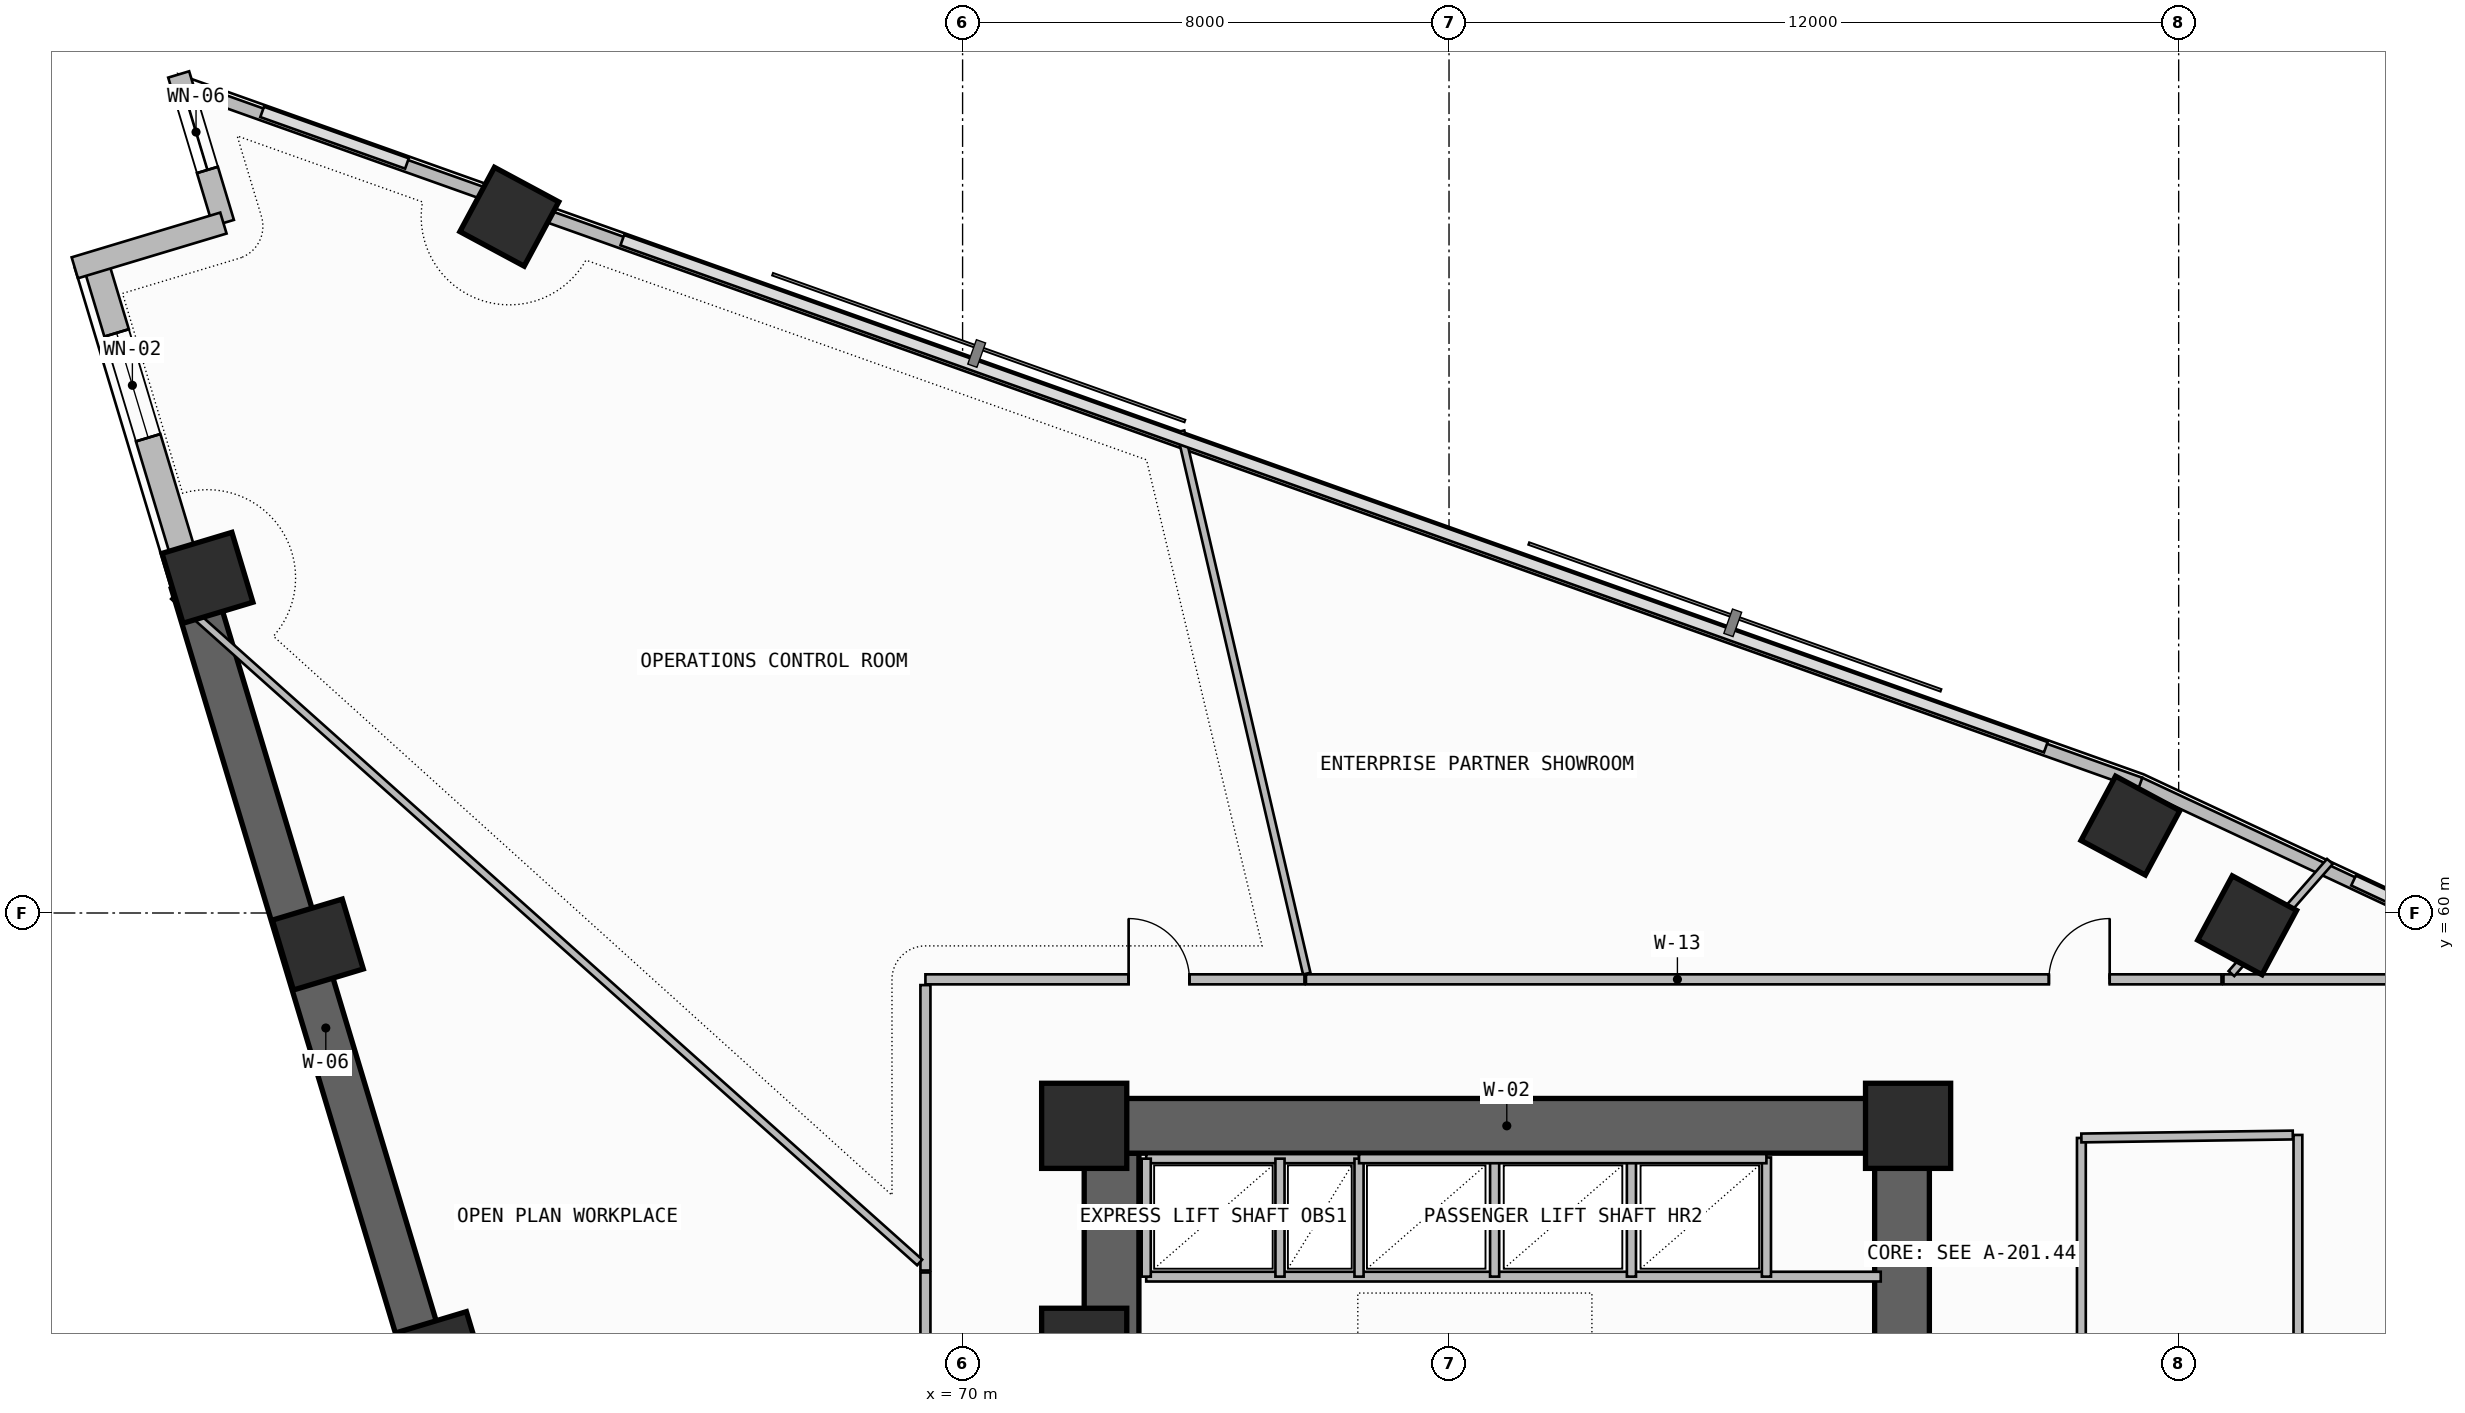
"""IFC4 building model, lengths in metres.
Left out: names, types, materials, properties, quantities, classifications, styles, units other than length and angle.
Written with IfcOpenShell. Run it as: python <this file> out.ifc"""

import sys

from ifc_helpers import new_model, si_unit, direction, frame, frame_2d, origin, origin_2d, place, context, subcontext, project, spatial, rectangle, extrude, element, fill, save


model = new_model("IFC4")
c1 = context("Model", 3, precision=1e-05, world=origin(), true_north=direction((0.0, 1.0)))
c2 = subcontext(c1, "Body", "Model", "MODEL_VIEW")
j1 = project(units=[si_unit("LENGTHUNIT", "METRE"), si_unit("PLANEANGLEUNIT", "RADIAN")], contexts=[c1])
p1 = place(None, origin())
s1 = spatial("IfcSite", under=j1, at=p1, CompositionType="ELEMENT")
p2 = place(p1, origin())
s2 = spatial("IfcBuilding", under=s1, at=p2, CompositionType="ELEMENT")
p3 = place(p2, frame((0.0, 0.0, 157.5)))
s3 = spatial("IfcBuildingStorey", under=s2, at=p3, CompositionType="ELEMENT", Elevation=157.5)
p4 = place(p3, frame((72.45, 43.35, -0.26), z_axis=(0.0, 0.0, 1.0), x_axis=(0.0, 1.0, 0.0)))
e1 = element("IfcWall", 1, at=p4, inside=s3, PredefinedType="SHEAR", context=c2, shape_type="SweptSolid", body=[
    extrude(rectangle(XDim=12.7, YDim=0.9, at=frame_2d((6.35, 0.0))), origin(), (0.0, 0.0, 1.0), 3.6),
])
p5 = place(p4, frame((1.35, 0.0, 0.26)))
e2 = element("IfcOpeningElement", 2, at=p5, cuts=e1, PredefinedType="OPENING", context=c2, shape_type="SweptSolid", body=[
    extrude(rectangle(XDim=1.2, YDim=2.2, at=frame_2d((0.6, 1.1))), frame((0.0, 0.46, 0.0), z_axis=(0.0, -1.0, 0.0), x_axis=(1.0, 0.0, 0.0)), (0.0, 0.0, 1.0), 0.92),
])
p6 = place(p3, frame((72.0, 56.5, -0.26), z_axis=(0.0, 0.0, 1.0), x_axis=(1.0, 0.0, 0.0)))
e3 = element("IfcWall", 3, at=p6, inside=s3, PredefinedType="SHEAR", context=c2, shape_type="SweptSolid", body=[
    extrude(rectangle(XDim=13.9, YDim=0.9, at=frame_2d((6.95, 0.0))), origin(), (0.0, 0.0, 1.0), 3.6),
])
p7 = place(p3, frame((85.45, 47.6, -0.26), z_axis=(0.0, 0.0, 1.0), x_axis=(0.0, 1.0, 0.0)))
e4 = element("IfcWall", 4, at=p7, inside=s3, PredefinedType="SHEAR", context=c2, shape_type="SweptSolid", body=[
    extrude(rectangle(XDim=8.45, YDim=0.9, at=frame_2d((4.225, 0.0))), origin(), (0.0, 0.0, 1.0), 3.6),
])
for number, where, z_axis, x_axis in (
    (5, (72.0, 52.8, 0.0), (0.0, 0.0, 1.0), (1.0, 0.0, 0.0)),
    (6, (72.0, 56.5, 0.0), (0.0, 0.0, 1.0), (1.0, 0.0, 0.0)),
    (7, (85.55, 56.5, 0.0), (0.0, 0.0, 1.0), (1.0, 0.0, 0.0)),
):
    element("IfcColumn", number, at=place(p3, frame(where, z_axis=z_axis, x_axis=x_axis)), inside=s3, PredefinedType="COLUMN", context=c2, shape_type="SweptSolid", body=[
        extrude(rectangle(XDim=1.4, YDim=1.4, at=origin_2d()), origin(), (0.0, 0.0, 1.0), 3.6),
    ])
for number, where, z_axis, x_axis in (
    (8, (91.126, 59.798, 0.0), (0.0, 0.0, 1.0), (0.473, 0.881, 0.0)),
    (9, (89.207, 61.438, 0.0), (0.0, 0.0, 1.0), (0.473, 0.881, 0.0)),
    (10, (62.545, 71.45, 0.0), (0.0, 0.0, 1.0), (0.473, 0.881, 0.0)),
    (11, (57.581, 65.512, 0.0), (0.0, 0.0, 1.0), (-0.288, 0.958, 0.0)),
    (12, (59.396, 59.481, 0.0), (0.0, 0.0, 1.0), (-0.288, 0.958, 0.0)),
    (13, (61.438, 52.696, 0.0), (0.0, 0.0, 1.0), (-0.288, 0.958, 0.0)),
):
    element("IfcColumn", number, at=place(p3, frame(where, z_axis=z_axis, x_axis=x_axis)), inside=s3, PredefinedType="COLUMN", context=c2, shape_type="SweptSolid", body=[
        extrude(rectangle(XDim=1.2, YDim=1.2, at=origin_2d()), origin(), (0.0, 0.0, 1.0), 3.6),
    ])
p8 = place(p3, frame((55.734, 70.711, 0.0), z_axis=(0.0, 0.0, 1.0), x_axis=(0.288221590884, -0.957563739157, 0.0)))
e14 = element("IfcWall", 14, at=p8, inside=s3, PredefinedType="SOLIDWALL", context=c2, shape_type="SweptSolid", body=[
    extrude(rectangle(XDim=5.511, YDim=0.42, at=frame_2d((2.755, 0.0))), origin(), (0.0, 0.0, 1.0), 2.725),
])
p9 = place(p8, frame((1.223, 0.0, 1.2)))
e15 = element("IfcOpeningElement", 15, at=p9, cuts=e14, PredefinedType="OPENING", context=c2, shape_type="SweptSolid", body=[
    extrude(rectangle(XDim=1.8, YDim=0.9, at=frame_2d((0.9, 0.45))), frame((0.0, 0.22, 0.0), z_axis=(0.0, -1.0, 0.0), x_axis=(1.0, 0.0, 0.0)), (0.0, 0.0, 1.0), 0.44),
])
p10 = place(p3, frame((57.323, 65.434, -0.26), z_axis=(0.0, 0.0, 1.0), x_axis=(0.288188159352, -0.957573801234, 0.0)))
e16 = element("IfcWall", 16, at=p10, inside=s3, PredefinedType="SHEAR", context=c2, shape_type="SweptSolid", body=[
    extrude(rectangle(XDim=20.469, YDim=0.7, at=frame_2d((10.234, 0.0))), origin(), (0.0, 0.0, 1.0), 3.6),
])
p11 = place(p10, frame((15.3, 0.0, 1.2)))
e17 = element("IfcOpeningElement", 17, at=p11, cuts=e16, PredefinedType="OPENING", context=c2, shape_type="SweptSolid", body=[
    extrude(rectangle(XDim=1.8, YDim=0.9, at=frame_2d((0.9, 0.45))), frame((0.0, 0.36, 0.0), z_axis=(0.0, -1.0, 0.0), x_axis=(1.0, 0.0, 0.0)), (0.0, 0.0, 1.0), 0.72),
])
p12 = place(p3, frame((57.108, 73.79, 0.0), z_axis=(0.0, 0.0, 1.0), x_axis=(0.288198985694, -0.957570542908, 0.0)))
e18 = element("IfcWall", 18, at=p12, inside=s3, PredefinedType="SOLIDWALL", context=c2, shape_type="SweptSolid", body=[
    extrude(rectangle(XDim=2.552, YDim=0.36, at=frame_2d((1.276, 0.0))), origin(), (0.0, 0.0, 1.0), 3.34),
])
p13 = place(p12, frame((0.34, 0.0, 0.45)))
e19 = element("IfcOpeningElement", 19, at=p13, cuts=e18, PredefinedType="OPENING", context=c2, shape_type="SweptSolid", body=[
    extrude(rectangle(XDim=1.3, YDim=2.4, at=frame_2d((0.65, 1.2))), frame((0.0, 0.19, 0.0), z_axis=(0.0, -1.0, 0.0), x_axis=(1.0, 0.0, 0.0)), (0.0, 0.0, 1.0), 0.38),
])
p14 = place(p3, frame((57.843, 71.346, 0.0), z_axis=(0.0, 0.0, 1.0), x_axis=(-0.95757848653, -0.288172590882, 0.0)))
e20 = element("IfcWall", 20, at=p14, inside=s3, PredefinedType="SOLIDWALL", context=c2, shape_type="SweptSolid", body=[
    extrude(rectangle(XDim=2.553, YDim=0.36, at=frame_2d((1.276, 0.0))), origin(), (0.0, 0.0, 1.0), 3.34),
])
p15 = place(p3, frame((119.926, 47.843, 0.0), z_axis=(0.0, 0.0, 1.0), x_axis=(-0.905880730846, 0.423532881228, 0.0)))
e21 = element("IfcWall", 21, at=p15, inside=s3, PredefinedType="PARAPET", context=c2, shape_type="SweptSolid", body=[
    extrude(rectangle(XDim=33.748, YDim=0.2, at=frame_2d((16.874, 0.0))), origin(), (0.0, 0.0, 1.0), 1.15),
])
p16 = place(p3, frame((89.368, 62.13, 0.0), z_axis=(0.0, 0.0, 1.0), x_axis=(-0.942033439765, 0.335518998515, 0.0)))
e22 = element("IfcWall", 22, at=p16, inside=s3, PredefinedType="PARAPET", context=c2, shape_type="SweptSolid", body=[
    extrude(rectangle(XDim=27.969, YDim=0.2, at=frame_2d((13.985, 0.0))), origin(), (0.0, 0.0, 1.0), 1.15),
])
p17 = place(p3, frame((62.218, 71.801, 0.0), z_axis=(0.0, 0.0, 1.0), x_axis=(-0.942038862895, 0.335503771655, 0.0)))
e23 = element("IfcWall", 23, at=p17, inside=s3, PredefinedType="PARAPET", context=c2, shape_type="SweptSolid", body=[
    extrude(rectangle(XDim=4.942, YDim=0.2, at=frame_2d((2.471, 0.0))), origin(), (0.0, 0.0, 1.0), 1.15),
])
p18 = place(p3, frame((73.02, 54.02, 0.0), z_axis=(0.0, 0.0, 1.0), x_axis=(1.0, 0.0, 0.0)))
e24 = element("IfcWall", 24, at=p18, inside=s3, PredefinedType="SOLIDWALL", context=c2, shape_type="SweptSolid", body=[
    extrude(rectangle(XDim=12.08, YDim=0.16, at=frame_2d((6.04, 0.0))), origin(), (0.0, 0.0, 1.0), 3.34),
])
p19 = place(p3, frame((73.02, 55.96, 0.0), z_axis=(0.0, 0.0, 1.0), x_axis=(1.0, 0.0, 0.0)))
e25 = element("IfcWall", 25, at=p19, inside=s3, PredefinedType="SOLIDWALL", context=c2, shape_type="SweptSolid", body=[
    extrude(rectangle(XDim=3.5, YDim=0.15, at=frame_2d((1.75, 0.0))), origin(), (0.0, 0.0, 1.0), 3.34),
])
p20 = place(p3, frame((73.02, 54.02, 0.0), z_axis=(0.0, 0.0, 1.0), x_axis=(0.0, 1.0, 0.0)))
e26 = element("IfcWall", 26, at=p20, inside=s3, PredefinedType="PLUMBINGWALL", context=c2, shape_type="SweptSolid", body=[
    extrude(rectangle(XDim=1.94, YDim=0.15, at=frame_2d((0.97, 0.0))), origin(), (0.0, 0.0, 1.0), 3.34),
])
p21 = place(p3, frame((76.52, 54.02, 0.0), z_axis=(0.0, 0.0, 1.0), x_axis=(0.0, 1.0, 0.0)))
e27 = element("IfcWall", 27, at=p21, inside=s3, PredefinedType="SOLIDWALL", context=c2, shape_type="SweptSolid", body=[
    extrude(rectangle(XDim=1.94, YDim=0.15, at=frame_2d((0.97, 0.0))), origin(), (0.0, 0.0, 1.0), 3.34),
])
p22 = place(p3, frame((75.22, 54.02, 0.0), z_axis=(0.0, 0.0, 1.0), x_axis=(0.0, 1.0, 0.0)))
e28 = element("IfcWall", 28, at=p22, inside=s3, PredefinedType="PLUMBINGWALL", context=c2, shape_type="SweptSolid", body=[
    extrude(rectangle(XDim=1.94, YDim=0.15, at=frame_2d((0.97, 0.0))), origin(), (0.0, 0.0, 1.0), 3.34),
])
for number, where, z_axis, x_axis in (
    (29, (78.75, 54.02, 0.0), (0.0, 0.0, 1.0), (0.0, 1.0, 0.0)),
    (30, (81.0, 54.02, 0.0), (0.0, 0.0, 1.0), (0.0, 1.0, 0.0)),
):
    element("IfcWall", number, at=place(p3, frame(where, z_axis=z_axis, x_axis=x_axis)), inside=s3, PredefinedType="PLUMBINGWALL", context=c2, shape_type="SweptSolid", body=[
        extrude(rectangle(XDim=1.96, YDim=0.15, at=frame_2d((0.98, 0.0))), origin(), (0.0, 0.0, 1.0), 3.34),
    ])
p23 = place(p3, frame((83.22, 54.02, 0.0), z_axis=(0.0, 0.0, 1.0), x_axis=(0.0, 1.0, 0.0)))
e31 = element("IfcWall", 31, at=p23, inside=s3, PredefinedType="SOLIDWALL", context=c2, shape_type="SweptSolid", body=[
    extrude(rectangle(XDim=1.96, YDim=0.15, at=frame_2d((0.98, 0.0))), origin(), (0.0, 0.0, 1.0), 3.34),
])
p24 = place(p3, frame((76.52, 55.96, 0.0), z_axis=(0.0, 0.0, 1.0), x_axis=(1.0, 0.0, 0.0)))
e32 = element("IfcWall", 32, at=p24, inside=s3, PredefinedType="SOLIDWALL", context=c2, shape_type="SweptSolid", body=[
    extrude(rectangle(XDim=6.7, YDim=0.15, at=frame_2d((3.35, 0.0))), origin(), (0.0, 0.0, 1.0), 3.34),
])
p25 = place(p3, frame((93.967, 58.909, 0.0), z_axis=(0.0, 0.0, 1.0), x_axis=(-1.0, 0.0, 0.0)))
e33 = element("IfcWall", 33, at=p25, inside=s3, PredefinedType="PARTITIONING", context=c2, shape_type="SweptSolid", body=[
    extrude(rectangle(XDim=3.23, YDim=0.165, at=frame_2d((1.615, 0.0))), origin(), (0.0, 0.0, 1.0), 2.725),
])
p26 = place(p3, frame((90.868, 59.003, 0.0), z_axis=(0.0, 0.0, 1.0), x_axis=(0.659714872629, 0.751515992399, 0.0)))
e34 = element("IfcWall", 34, at=p26, inside=s3, PredefinedType="PARTITIONING", context=c2, shape_type="SweptSolid", body=[
    extrude(rectangle(XDim=2.455, YDim=0.125, at=frame_2d((1.227, 0.0))), origin(), (0.0, 0.0, 1.0), 2.725),
])
p27 = place(p3, frame((91.961, 56.35, 0.0), z_axis=(0.0, 0.0, 1.0), x_axis=(0.0, -1.0, 0.0)))
e35 = element("IfcWall", 35, at=p27, inside=s3, PredefinedType="PARTITIONING", context=c2, shape_type="SweptSolid", body=[
    extrude(rectangle(XDim=10.618, YDim=0.145, at=frame_2d((5.309, 0.0))), origin(), (0.0, 0.0, 1.0), 2.725),
])
p28 = place(p27, frame((4.859, 0.0, 0.0)))
e36 = element("IfcOpeningElement", 36, at=p28, cuts=e35, PredefinedType="OPENING", context=c2, shape_type="SweptSolid", body=[
    extrude(rectangle(XDim=0.9, YDim=2.1, at=frame_2d((0.45, 1.05))), frame((0.0, 0.083, 0.0), z_axis=(0.0, -1.0, 0.0), x_axis=(1.0, 0.0, 0.0)), (0.0, 0.0, 1.0), 0.165),
])
p29 = place(p3, frame((88.4, 45.699, 0.0), z_axis=(0.0, 0.0, 1.0), x_axis=(0.0, 1.0, 0.0)))
e37 = element("IfcWall", 37, at=p29, inside=s3, PredefinedType="PARTITIONING", context=c2, shape_type="SweptSolid", body=[
    extrude(rectangle(XDim=10.601, YDim=0.145, at=frame_2d((5.3, 0.0))), origin(), (0.0, 0.0, 1.0), 2.725),
])
p30 = place(p3, frame((88.4, 56.3, 0.0), z_axis=(0.0, 0.0, 1.0), x_axis=(0.999902381622, 0.013972373706, 0.0)))
e38 = element("IfcWall", 38, at=p30, inside=s3, PredefinedType="PARTITIONING", context=c2, shape_type="SweptSolid", body=[
    extrude(rectangle(XDim=3.477, YDim=0.145, at=frame_2d((1.739, 0.0))), origin(), (0.0, 0.0, 1.0), 2.925),
])
p31 = place(p3, frame((90.704, 58.909, 0.0), z_axis=(0.0, 0.0, 1.0), x_axis=(-1.0, 0.0, 0.0)))
e39 = element("IfcWall", 39, at=p31, inside=s3, PredefinedType="PARTITIONING", context=c2, shape_type="SweptSolid", body=[
    extrude(rectangle(XDim=15.057, YDim=0.165, at=frame_2d((7.529, 0.0))), origin(), (0.0, 0.0, 1.0), 2.725),
])
p32 = place(p31, frame((1.839, 0.0, 0.0)))
e40 = element("IfcOpeningElement", 40, at=p32, cuts=e39, PredefinedType="OPENING", context=c2, shape_type="SweptSolid", body=[
    extrude(rectangle(XDim=1.0, YDim=2.2, at=frame_2d((0.5, 1.1))), frame((0.0, 0.093, 0.0), z_axis=(0.0, -1.0, 0.0), x_axis=(1.0, 0.0, 0.0)), (0.0, 0.0, 1.0), 0.185),
])
p33 = place(p3, frame((75.66, 59.003, 0.0), z_axis=(0.0, 0.0, 1.0), x_axis=(-0.226611733349, 0.97398517561, 0.0)))
e41 = element("IfcWall", 41, at=p33, inside=s3, PredefinedType="PARTITIONING", context=c2, shape_type="SweptSolid", body=[
    extrude(rectangle(XDim=9.156, YDim=0.125, at=frame_2d((4.578, 0.0))), origin(), (0.0, 0.0, 1.0), 3.34),
])
p34 = place(p3, frame((75.622, 58.909, 0.0), z_axis=(0.0, 0.0, 1.0), x_axis=(-1.0, 0.0, 0.0)))
e42 = element("IfcWall", 42, at=p34, inside=s3, PredefinedType="PARTITIONING", context=c2, shape_type="SweptSolid", body=[
    extrude(rectangle(XDim=6.233, YDim=0.165, at=frame_2d((3.117, 0.0))), origin(), (0.0, 0.0, 1.0), 2.725),
])
p35 = place(p34, frame((1.892, 0.0, 0.0)))
e43 = element("IfcOpeningElement", 43, at=p35, cuts=e42, PredefinedType="OPENING", context=c2, shape_type="SweptSolid", body=[
    extrude(rectangle(XDim=1.0, YDim=2.2, at=frame_2d((0.5, 1.1))), frame((0.0, 0.093, 0.0), z_axis=(0.0, -1.0, 0.0), x_axis=(1.0, 0.0, 0.0)), (0.0, 0.0, 1.0), 0.185),
])
p36 = place(p3, frame((69.389, 58.814, 0.0), z_axis=(0.0, 0.0, 1.0), x_axis=(0.0, -1.0, 0.0)))
e44 = element("IfcWall", 44, at=p36, inside=s3, PredefinedType="PARTITIONING", context=c2, shape_type="SweptSolid", body=[
    extrude(rectangle(XDim=4.694, YDim=0.165, at=frame_2d((2.347, 0.0))), origin(), (0.0, 0.0, 1.0), 2.725),
])
p37 = place(p3, frame((69.294, 54.253, 0.0), z_axis=(0.0, 0.0, 1.0), x_axis=(-0.745872091983, 0.666089200033, 0.0)))
e45 = element("IfcWall", 45, at=p37, inside=s3, PredefinedType="PARTITIONING", context=c2, shape_type="SweptSolid", body=[
    extrude(rectangle(XDim=16.451, YDim=0.125, at=frame_2d((8.226, 0.0))), origin(), (0.0, 0.0, 1.0), 2.725),
])
p38 = place(p3, frame((69.389, 54.088, 0.0), z_axis=(0.0, 0.0, 1.0), x_axis=(0.0, -1.0, 0.0)))
e46 = element("IfcWall", 46, at=p38, inside=s3, PredefinedType="PARTITIONING", context=c2, shape_type="SweptSolid", body=[
    extrude(rectangle(XDim=4.789, YDim=0.165, at=frame_2d((2.394, 0.0))), origin(), (0.0, 0.0, 1.0), 2.725),
])
p39 = place(p38, frame((1.176, 0.0, 0.0)))
e47 = element("IfcOpeningElement", 47, at=p39, cuts=e46, PredefinedType="OPENING", context=c2, shape_type="SweptSolid", body=[
    extrude(rectangle(XDim=1.6, YDim=2.3, at=frame_2d((0.8, 1.15))), frame((0.0, 0.093, 0.0), z_axis=(0.0, -1.0, 0.0), x_axis=(1.0, 0.0, 0.0)), (0.0, 0.0, 1.0), 0.185),
])
p40 = place(p9, origin())
e48 = element("IfcWindow", 48, at=p40, inside=s3, PartitioningType="SINGLE_PANEL", PredefinedType="WINDOW", context=c2, shape_type="SweptSolid", body=[
    extrude(rectangle(XDim=1.8, YDim=0.9, at=frame_2d((0.9, 0.45))), frame((0.0, 0.03, 0.0), z_axis=(0.0, -1.0, 0.0), x_axis=(1.0, 0.0, 0.0)), (0.0, 0.0, 1.0), 0.06),
])
fill(e15, e48)
p41 = place(p13, origin())
e49 = element("IfcWindow", 49, at=p41, inside=s3, PartitioningType="SINGLE_PANEL", PredefinedType="WINDOW", context=c2, shape_type="SweptSolid", body=[
    extrude(rectangle(XDim=1.3, YDim=2.4, at=frame_2d((0.65, 1.2))), frame((0.0, 0.03, 0.0), z_axis=(0.0, -1.0, 0.0), x_axis=(1.0, 0.0, 0.0)), (0.0, 0.0, 1.0), 0.06),
])
fill(e19, e49)
p42 = place(p32, frame((1.0, 0.0, 0.0), z_axis=(0.0, 0.0, 1.0), x_axis=(-1.0, 0.0, 0.0)))
e50 = element("IfcDoor", 50, at=p42, inside=s3, OperationType="SINGLE_SWING_RIGHT", PredefinedType="DOOR", context=c2, shape_type="SweptSolid", body=[
    extrude(rectangle(XDim=1.0, YDim=2.2, at=frame_2d((0.5, 1.1))), frame((0.0, 0.025, 0.0), z_axis=(0.0, -1.0, 0.0), x_axis=(1.0, 0.0, 0.0)), (0.0, 0.0, 1.0), 0.05),
])
fill(e40, e50)
p43 = place(p35, frame((1.0, 0.0, 0.0), z_axis=(0.0, 0.0, 1.0), x_axis=(-1.0, 0.0, 0.0)))
e51 = element("IfcDoor", 51, at=p43, inside=s3, OperationType="SINGLE_SWING_LEFT", PredefinedType="DOOR", context=c2, shape_type="SweptSolid", body=[
    extrude(rectangle(XDim=1.0, YDim=2.2, at=frame_2d((0.5, 1.1))), frame((0.0, 0.025, 0.0), z_axis=(0.0, -1.0, 0.0), x_axis=(1.0, 0.0, 0.0)), (0.0, 0.0, 1.0), 0.05),
])
fill(e43, e51)
save(model, sys.argv[1])
